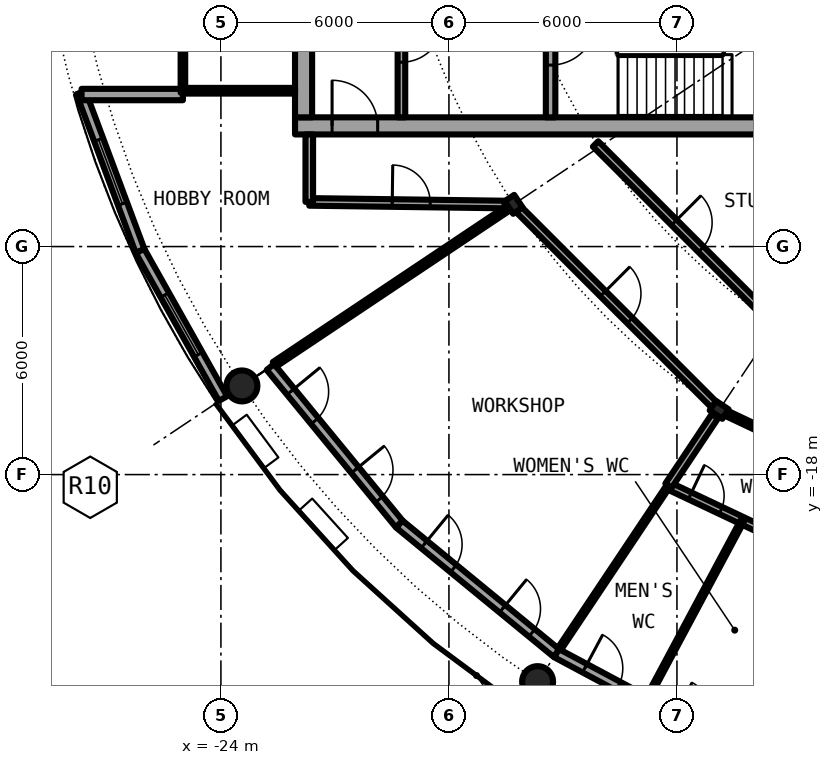
"""IFC4 building model, lengths in metres.
Left out: names, types, materials, properties, quantities, classifications, styles, units other than length and angle.
Written with IfcOpenShell. Run it as: python <this file> out.ifc"""

import sys

from ifc_helpers import new_model, si_unit, direction, frame, frame_2d, origin, origin_2d, place, context, subcontext, project, spatial, rectangle, hollow_circle, i_section, extrude, element, fill, save


model = new_model("IFC4")
c1 = context("Model", 3, precision=1e-05, world=origin(), true_north=direction((0.0, 1.0)))
c2 = subcontext(c1, "Body", "Model", "MODEL_VIEW")
j1 = project(units=[si_unit("LENGTHUNIT", "METRE"), si_unit("PLANEANGLEUNIT", "RADIAN")], contexts=[c1])
p1 = place(None, origin())
s1 = spatial("IfcSite", under=j1, at=p1, CompositionType="ELEMENT")
p2 = place(p1, origin())
s2 = spatial("IfcBuilding", under=s1, at=p2, CompositionType="ELEMENT")
p3 = place(p2, frame((0.0, 0.0, 208.5)))
s3 = spatial("IfcBuildingStorey", under=s2, at=p3, CompositionType="ELEMENT", Elevation=208.5)
for number, where, z_axis, x_axis in (
    (1, (-23.448, -15.667, 0.0), (0.0, 0.0, 1.0), (1.0, 0.0, 0.0)),
    (2, (-15.667, -23.448, 0.0), (0.0, 0.0, 1.0), (1.0, 0.0, 0.0)),
):
    element("IfcColumn", number, at=place(p3, frame(where, z_axis=z_axis, x_axis=x_axis)), inside=s3, PredefinedType="COLUMN", context=c2, shape_type="SweptSolid", body=[
        extrude(hollow_circle(Radius=0.406, WallThickness=0.03, at=origin_2d()), origin(), (0.0, 0.0, 1.0), 4.2),
    ])
for number, where, z_axis, x_axis in (
    (3, (-16.297, -10.889, 0.0), (0.0, 0.0, 1.0), (-0.831, -0.556, 0.0)),
    (4, (-10.889, -16.297, 0.0), (0.0, 0.0, 1.0), (-0.556, -0.831, 0.0)),
):
    element("IfcColumn", number, at=place(p3, frame(where, z_axis=z_axis, x_axis=x_axis)), inside=s3, PredefinedType="COLUMN", context=c2, shape_type="SweptSolid", body=[
        extrude(i_section(OverallWidth=0.3, OverallDepth=0.4, WebThickness=0.013, FlangeThickness=0.024, FilletRadius=0.027, at=origin_2d()), origin(), (0.0, 0.0, 1.0), 4.2),
    ])
p4 = place(p3, frame((-22.699, -15.167, 0.0), z_axis=(0.0, 0.0, 1.0), x_axis=(0.634382322723, -0.773019449054, 0.0)))
e5 = element("IfcWall", 5, at=p4, inside=s3, PredefinedType="SOLIDWALL", context=c2, shape_type="SweptSolid", body=[
    extrude(rectangle(XDim=5.352, YDim=0.25, at=frame_2d((2.676, 0.0))), origin(), (0.0, 0.0, 1.0), 3.85),
])
p5 = place(p4, frame((0.841, 0.0, 0.0)))
e6 = element("IfcOpeningElement", 6, at=p5, cuts=e5, PredefinedType="OPENING", context=c2, shape_type="SweptSolid", body=[
    extrude(rectangle(XDim=1.0, YDim=2.2, at=frame_2d((0.5, 1.1))), frame((0.0, 0.135, 0.0), z_axis=(0.0, -1.0, 0.0), x_axis=(1.0, 0.0, 0.0)), (0.0, 0.0, 1.0), 0.27),
])
p6 = place(p4, frame((3.51, 0.0, 0.0)))
e7 = element("IfcOpeningElement", 7, at=p6, cuts=e5, PredefinedType="OPENING", context=c2, shape_type="SweptSolid", body=[
    extrude(rectangle(XDim=1.0, YDim=2.2, at=frame_2d((0.5, 1.1))), frame((0.0, 0.135, 0.0), z_axis=(0.0, -1.0, 0.0), x_axis=(1.0, 0.0, 0.0)), (0.0, 0.0, 1.0), 0.27),
])
p7 = place(p3, frame((-19.304, -19.304, 0.0), z_axis=(0.0, 0.0, 1.0), x_axis=(0.773019449054, -0.634382322723, 0.0)))
e8 = element("IfcWall", 8, at=p7, inside=s3, PredefinedType="SOLIDWALL", context=c2, shape_type="SweptSolid", body=[
    extrude(rectangle(XDim=5.352, YDim=0.25, at=frame_2d((2.676, 0.0))), origin(), (0.0, 0.0, 1.0), 3.85),
])
p8 = place(p7, frame((0.841, 0.0, 0.0)))
e9 = element("IfcOpeningElement", 9, at=p8, cuts=e8, PredefinedType="OPENING", context=c2, shape_type="SweptSolid", body=[
    extrude(rectangle(XDim=1.0, YDim=2.2, at=frame_2d((0.5, 1.1))), frame((0.0, 0.135, 0.0), z_axis=(0.0, -1.0, 0.0), x_axis=(1.0, 0.0, 0.0)), (0.0, 0.0, 1.0), 0.27),
])
p9 = place(p7, frame((3.51, 0.0, 0.0)))
e10 = element("IfcOpeningElement", 10, at=p9, cuts=e8, PredefinedType="OPENING", context=c2, shape_type="SweptSolid", body=[
    extrude(rectangle(XDim=1.0, YDim=2.2, at=frame_2d((0.5, 1.1))), frame((0.0, 0.135, 0.0), z_axis=(0.0, -1.0, 0.0), x_axis=(1.0, 0.0, 0.0)), (0.0, 0.0, 1.0), 0.27),
])
p10 = place(p3, frame((-15.167, -22.699, 0.0), z_axis=(0.0, 0.0, 1.0), x_axis=(0.881915646801, -0.471407246368, 0.0)))
e11 = element("IfcWall", 11, at=p10, inside=s3, PredefinedType="SOLIDWALL", context=c2, shape_type="SweptSolid", body=[
    extrude(rectangle(XDim=5.352, YDim=0.25, at=frame_2d((2.676, 0.0))), origin(), (0.0, 0.0, 1.0), 3.85),
])
p11 = place(p10, frame((0.841, 0.0, 0.0)))
e12 = element("IfcOpeningElement", 12, at=p11, cuts=e11, PredefinedType="OPENING", context=c2, shape_type="SweptSolid", body=[
    extrude(rectangle(XDim=1.0, YDim=2.2, at=frame_2d((0.5, 1.1))), frame((0.0, 0.135, 0.0), z_axis=(0.0, -1.0, 0.0), x_axis=(1.0, 0.0, 0.0)), (0.0, 0.0, 1.0), 0.27),
])
p12 = place(p10, frame((3.51, 0.0, 0.0)))
e13 = element("IfcOpeningElement", 13, at=p12, cuts=e11, PredefinedType="OPENING", context=c2, shape_type="SweptSolid", body=[
    extrude(rectangle(XDim=1.0, YDim=2.2, at=frame_2d((0.5, 1.1))), frame((0.0, 0.135, 0.0), z_axis=(0.0, -1.0, 0.0), x_axis=(1.0, 0.0, 0.0)), (0.0, 0.0, 1.0), 0.27),
])
p13 = place(p3, frame((-27.682, -7.945, 0.0), z_axis=(0.0, 0.0, 1.0), x_axis=(0.349247811493, -0.937030397675, 0.0)))
e14 = element("IfcWall", 14, at=p13, inside=s3, PredefinedType="SOLIDWALL", context=c2, shape_type="SweptSolid", body=[
    extrude(rectangle(XDim=4.452, YDim=0.25, at=frame_2d((2.226, 0.0))), origin(), (0.0, 0.0, 1.0), 3.85),
])
p14 = place(p13, frame((1.327, 0.0, 0.3)))
e15 = element("IfcOpeningElement", 15, at=p14, cuts=e14, PredefinedType="OPENING", context=c2, shape_type="SweptSolid", body=[
    extrude(rectangle(XDim=1.8, YDim=2.1, at=frame_2d((0.9, 1.05))), frame((0.0, 0.135, 0.0), z_axis=(0.0, -1.0, 0.0), x_axis=(1.0, 0.0, 0.0)), (0.0, 0.0, 1.0), 0.27),
])
p15 = place(p3, frame((-26.127, -12.117, 0.0), z_axis=(0.0, 0.0, 1.0), x_axis=(0.489696356642, -0.871893042919, 0.0)))
e16 = element("IfcWall", 16, at=p15, inside=s3, PredefinedType="SOLIDWALL", context=c2, shape_type="SweptSolid", body=[
    extrude(rectangle(XDim=4.454, YDim=0.25, at=frame_2d((2.227, 0.0))), origin(), (0.0, 0.0, 1.0), 3.85),
])
p16 = place(p15, frame((1.327, 0.0, 0.3)))
e17 = element("IfcOpeningElement", 17, at=p16, cuts=e16, PredefinedType="OPENING", context=c2, shape_type="SweptSolid", body=[
    extrude(rectangle(XDim=1.8, YDim=2.1, at=frame_2d((0.9, 1.05))), frame((0.0, 0.135, 0.0), z_axis=(0.0, -1.0, 0.0), x_axis=(1.0, 0.0, 0.0)), (0.0, 0.0, 1.0), 0.27),
])
p17 = place(p3, frame((-25.0, -8.0, 0.0), z_axis=(0.0, 0.0, 1.0), x_axis=(-1.0, 0.0, 0.0)))
e18 = element("IfcWall", 18, at=p17, inside=s3, PredefinedType="SOLIDWALL", context=c2, shape_type="SweptSolid", body=[
    extrude(rectangle(XDim=2.667, YDim=0.3, at=frame_2d((1.333, 0.0))), origin(), (0.0, 0.0, 1.0), 3.85),
])
p18 = place(p3, frame((-22.05, -8.825, 0.0), z_axis=(0.0, 0.0, 1.0), x_axis=(1.0, 0.0, 0.0)))
e19 = element("IfcWall", 19, at=p18, inside=s3, PredefinedType="SHEAR", context=c2, shape_type="SweptSolid", body=[
    extrude(rectangle(XDim=13.5, YDim=0.45, at=frame_2d((6.75, 0.0))), origin(), (0.0, 0.0, 1.0), 4.2),
])
p19 = place(p18, frame((0.975, 0.0, 0.0)))
e20 = element("IfcOpeningElement", 20, at=p19, cuts=e19, PredefinedType="OPENING", context=c2, shape_type="SweptSolid", body=[
    extrude(rectangle(XDim=1.2, YDim=2.3, at=frame_2d((0.6, 1.15))), frame((0.0, 0.235, 0.0), z_axis=(0.0, -1.0, 0.0), x_axis=(1.0, 0.0, 0.0)), (0.0, 0.0, 1.0), 0.47),
])
p20 = place(p3, frame((-21.825, -8.6, 0.0), z_axis=(0.0, 0.0, 1.0), x_axis=(0.0, 1.0, 0.0)))
e21 = element("IfcWall", 21, at=p20, inside=s3, PredefinedType="SHEAR", context=c2, shape_type="SweptSolid", body=[
    extrude(rectangle(XDim=17.2, YDim=0.45, at=frame_2d((8.6, 0.0))), origin(), (0.0, 0.0, 1.0), 4.2),
])
p21 = place(p20, frame((7.7, 0.0, 0.0)))
e22 = element("IfcOpeningElement", 22, at=p21, cuts=e21, PredefinedType="OPENING", context=c2, shape_type="SweptSolid", body=[
    extrude(rectangle(XDim=1.8, YDim=2.3, at=frame_2d((0.9, 1.15))), frame((0.0, 0.235, 0.0), z_axis=(0.0, -1.0, 0.0), x_axis=(1.0, 0.0, 0.0)), (0.0, 0.0, 1.0), 0.47),
])
p22 = place(p3, frame((-15.325, -4.65, 0.0), z_axis=(0.0, 0.0, 1.0), x_axis=(0.0, -1.0, 0.0)))
e23 = element("IfcWall", 23, at=p22, inside=s3, PredefinedType="SHEAR", context=c2, shape_type="SweptSolid", body=[
    extrude(rectangle(XDim=3.95, YDim=0.25, at=frame_2d((1.975, 0.0))), origin(), (0.0, 0.0, 1.0), 4.2),
])
p23 = place(p22, frame((1.375, 0.0, 0.0)))
e24 = element("IfcOpeningElement", 24, at=p23, cuts=e23, PredefinedType="OPENING", context=c2, shape_type="SweptSolid", body=[
    extrude(rectangle(XDim=1.2, YDim=2.3, at=frame_2d((0.6, 1.15))), frame((0.0, 0.135, 0.0), z_axis=(0.0, -1.0, 0.0), x_axis=(1.0, 0.0, 0.0)), (0.0, 0.0, 1.0), 0.27),
])
p24 = place(p3, frame((-19.25, -1.575, 0.0), z_axis=(0.0, 0.0, 1.0), x_axis=(0.0, -1.0, 0.0)))
e25 = element("IfcWall", 25, at=p24, inside=s3, PredefinedType="SOLIDWALL", context=c2, shape_type="SweptSolid", body=[
    extrude(rectangle(XDim=7.025, YDim=0.2, at=frame_2d((3.513, 0.0))), origin(), (0.0, 0.0, 1.0), 3.85),
])
p25 = place(p24, frame((4.475, 0.0, 0.0)))
e26 = element("IfcOpeningElement", 26, at=p25, cuts=e25, PredefinedType="OPENING", context=c2, shape_type="SweptSolid", body=[
    extrude(rectangle(XDim=1.1, YDim=2.3, at=frame_2d((0.55, 1.15))), frame((0.0, 0.11, 0.0), z_axis=(0.0, -1.0, 0.0), x_axis=(1.0, 0.0, 0.0)), (0.0, 0.0, 1.0), 0.22),
])
p26 = place(p3, frame((-22.05, -7.9, 0.0), z_axis=(0.0, 0.0, 1.0), x_axis=(-1.0, 0.0, 0.0)))
e27 = element("IfcWall", 27, at=p26, inside=s3, PredefinedType="PARTITIONING", context=c2, shape_type="SweptSolid", body=[
    extrude(rectangle(XDim=2.89, YDim=0.15, at=frame_2d((1.445, 0.0))), origin(), (0.0, 0.0, 1.0), 3.85),
])
p27 = place(p3, frame((-25.0, 7.95, 0.0), z_axis=(0.0, 0.0, 1.0), x_axis=(0.0, -1.0, 0.0)))
e28 = element("IfcWall", 28, at=p27, inside=s3, PredefinedType="PARTITIONING", context=c2, shape_type="SweptSolid", body=[
    extrude(rectangle(XDim=15.9, YDim=0.12, at=frame_2d((7.95, 0.0))), origin(), (0.0, 0.0, 1.0), 3.85),
])
p28 = place(p27, frame((0.95, 0.0, 0.1)))
e29 = element("IfcOpeningElement", 29, at=p28, cuts=e28, PredefinedType="OPENING", context=c2, shape_type="SweptSolid", body=[
    extrude(rectangle(XDim=14.0, YDim=3.5, at=frame_2d((7.0, 1.75))), frame((0.0, 0.07, 0.0), z_axis=(0.0, -1.0, 0.0), x_axis=(1.0, 0.0, 0.0)), (0.0, 0.0, 1.0), 0.14),
])
p29 = place(p3, frame((-12.223, -18.294, 0.0), z_axis=(0.0, 0.0, 1.0), x_axis=(0.904110764787, -0.427298168726, 0.0)))
e30 = element("IfcWall", 30, at=p29, inside=s3, PredefinedType="PARTITIONING", context=c2, shape_type="SweptSolid", body=[
    extrude(rectangle(XDim=6.459, YDim=0.2, at=frame_2d((3.229, 0.0))), origin(), (0.0, 0.0, 1.0), 3.85),
])
p30 = place(p29, frame((0.624, 0.0, 0.0)))
e31 = element("IfcOpeningElement", 31, at=p30, cuts=e30, PredefinedType="OPENING", context=c2, shape_type="SweptSolid", body=[
    extrude(rectangle(XDim=0.9, YDim=2.3, at=frame_2d((0.45, 1.15))), frame((0.0, 0.11, 0.0), z_axis=(0.0, -1.0, 0.0), x_axis=(1.0, 0.0, 0.0)), (0.0, 0.0, 1.0), 0.22),
])
p31 = place(p29, frame((2.788, 0.0, 0.0)))
e32 = element("IfcOpeningElement", 32, at=p31, cuts=e30, PredefinedType="OPENING", context=c2, shape_type="SweptSolid", body=[
    extrude(rectangle(XDim=0.9, YDim=2.3, at=frame_2d((0.45, 1.15))), frame((0.0, 0.11, 0.0), z_axis=(0.0, -1.0, 0.0), x_axis=(1.0, 0.0, 0.0)), (0.0, 0.0, 1.0), 0.22),
])
p32 = place(p29, frame((4.93, 0.0, 0.0)))
e33 = element("IfcOpeningElement", 33, at=p32, cuts=e30, PredefinedType="OPENING", context=c2, shape_type="SweptSolid", body=[
    extrude(rectangle(XDim=0.9, YDim=2.3, at=frame_2d((0.45, 1.15))), frame((0.0, 0.11, 0.0), z_axis=(0.0, -1.0, 0.0), x_axis=(1.0, 0.0, 0.0)), (0.0, 0.0, 1.0), 0.22),
])
p33 = place(p3, frame((-10.752, -16.362, 0.0), z_axis=(0.0, 0.0, 1.0), x_axis=(0.903996904196, -0.427539000798, 0.0)))
e34 = element("IfcWall", 34, at=p33, inside=s3, PredefinedType="PARTITIONING", context=c2, shape_type="SweptSolid", body=[
    extrude(rectangle(XDim=5.6, YDim=0.15, at=frame_2d((2.8, 0.0))), origin(), (0.0, 0.0, 1.0), 3.6),
])
p34 = place(p33, frame((2.224, 0.0, 0.0)))
e35 = element("IfcOpeningElement", 35, at=p34, cuts=e34, PredefinedType="OPENING", context=c2, shape_type="SweptSolid", body=[
    extrude(rectangle(XDim=1.0, YDim=2.3, at=frame_2d((0.5, 1.15))), frame((0.0, 0.085, 0.0), z_axis=(0.0, -1.0, 0.0), x_axis=(1.0, 0.0, 0.0)), (0.0, 0.0, 1.0), 0.17),
])
p35 = place(p3, frame((-16.189, -10.997, 0.0), z_axis=(0.0, 0.0, 1.0), x_axis=(0.707106781187, -0.707106781187, 0.0)))
e36 = element("IfcWall", 36, at=p35, inside=s3, PredefinedType="PARTITIONING", context=c2, shape_type="SweptSolid", body=[
    extrude(rectangle(XDim=7.343, YDim=0.2, at=frame_2d((3.671, 0.0))), origin(), (0.0, 0.0, 1.0), 3.6),
])
p36 = place(p35, frame((3.171, 0.0, 0.0)))
e37 = element("IfcOpeningElement", 37, at=p36, cuts=e36, PredefinedType="OPENING", context=c2, shape_type="SweptSolid", body=[
    extrude(rectangle(XDim=1.0, YDim=2.3, at=frame_2d((0.5, 1.15))), frame((0.0, 0.11, 0.0), z_axis=(0.0, -1.0, 0.0), x_axis=(1.0, 0.0, 0.0)), (0.0, 0.0, 1.0), 0.22),
])
p37 = place(p3, frame((-14.141, -9.3, 0.0), z_axis=(0.0, 0.0, 1.0), x_axis=(0.707124944964, -0.707088616942, 0.0)))
e38 = element("IfcWall", 38, at=p37, inside=s3, PredefinedType="PARTITIONING", context=c2, shape_type="SweptSolid", body=[
    extrude(rectangle(XDim=6.72, YDim=0.2, at=frame_2d((3.36, 0.0))), origin(), (0.0, 0.0, 1.0), 3.85),
])
p38 = place(p37, frame((2.923, 0.0, 0.0)))
e39 = element("IfcOpeningElement", 39, at=p38, cuts=e38, PredefinedType="OPENING", context=c2, shape_type="SweptSolid", body=[
    extrude(rectangle(XDim=1.0, YDim=2.3, at=frame_2d((0.5, 1.15))), frame((0.0, 0.11, 0.0), z_axis=(0.0, -1.0, 0.0), x_axis=(1.0, 0.0, 0.0)), (0.0, 0.0, 1.0), 0.22),
])
p39 = place(p3, frame((-21.675, -10.825, 0.0), z_axis=(0.0, 0.0, 1.0), x_axis=(0.999909707888, -0.013437859594, 0.0)))
e40 = element("IfcWall", 40, at=p39, inside=s3, PredefinedType="PARTITIONING", context=c2, shape_type="SweptSolid", body=[
    extrude(rectangle(XDim=5.142, YDim=0.2, at=frame_2d((2.571, 0.0))), origin(), (0.0, 0.0, 1.0), 3.85),
])
p40 = place(p39, frame((2.183, 0.0, 0.0)))
e41 = element("IfcOpeningElement", 41, at=p40, cuts=e40, PredefinedType="OPENING", context=c2, shape_type="SweptSolid", body=[
    extrude(rectangle(XDim=1.0, YDim=2.3, at=frame_2d((0.5, 1.15))), frame((0.0, 0.11, 0.0), z_axis=(0.0, -1.0, 0.0), x_axis=(1.0, 0.0, 0.0)), (0.0, 0.0, 1.0), 0.22),
])
p41 = place(p3, frame((-22.593, -15.101, 0.0), z_axis=(0.0, 0.0, 1.0), x_axis=(0.831418274402, 0.555647057933, 0.0)))
e42 = element("IfcWall", 42, at=p41, inside=s3, PredefinedType="PARTITIONING", context=c2, shape_type="SweptSolid", body=[
    extrude(rectangle(XDim=7.375, YDim=0.15, at=frame_2d((3.688, 0.0))), origin(), (0.0, 0.0, 1.0), 3.85),
])
p42 = place(p3, frame((-15.098, -22.595, 0.0), z_axis=(0.0, 0.0, 1.0), x_axis=(0.555679526155, 0.831396574573, 0.0)))
e43 = element("IfcWall", 43, at=p42, inside=s3, PredefinedType="PARTITIONING", context=c2, shape_type="SweptSolid", body=[
    extrude(rectangle(XDim=5.176, YDim=0.1, at=frame_2d((2.588, 0.0))), origin(), (0.0, 0.0, 1.0), 3.85),
])
p43 = place(p3, frame((-12.818, -23.962, 0.0), z_axis=(0.0, 0.0, 1.0), x_axis=(0.471698142177, 0.881760093601, 0.0)))
e44 = element("IfcWall", 44, at=p43, inside=s3, PredefinedType="PARTITIONING", context=c2, shape_type="SweptSolid", body=[
    extrude(rectangle(XDim=5.387, YDim=0.1, at=frame_2d((2.693, 0.0))), origin(), (0.0, 0.0, 1.0), 3.85),
])
p44 = place(p3, frame((-12.222, -18.292, 0.0), z_axis=(0.0, 0.0, 1.0), x_axis=(0.555493933307, 0.831520589077, 0.0)))
e45 = element("IfcWall", 45, at=p44, inside=s3, PredefinedType="PARTITIONING", context=c2, shape_type="SweptSolid", body=[
    extrude(rectangle(XDim=2.2, YDim=0.2, at=frame_2d((1.1, 0.0))), origin(), (0.0, 0.0, 1.0), 3.85),
])
p45 = place(p3, frame((-10.391, -25.11, 0.0), z_axis=(0.0, 0.0, 1.0), x_axis=(0.38229040446, 0.924042232075, 0.0)))
e46 = element("IfcWall", 46, at=p45, inside=s3, PredefinedType="PARTITIONING", context=c2, shape_type="SweptSolid", body=[
    extrude(rectangle(XDim=5.386, YDim=0.1, at=frame_2d((2.693, 0.0))), origin(), (0.0, 0.0, 1.0), 3.85),
])
p46 = place(p3, frame((-21.675, -10.825, 0.0), z_axis=(0.0, 0.0, 1.0), x_axis=(0.0, 1.0, 0.0)))
e47 = element("IfcWall", 47, at=p46, inside=s3, PredefinedType="PARTITIONING", context=c2, shape_type="SweptSolid", body=[
    extrude(rectangle(XDim=1.775, YDim=0.2, at=frame_2d((0.887, 0.0))), origin(), (0.0, 0.0, 1.0), 3.85),
])
p47 = place(p5, origin())
e48 = element("IfcDoor", 48, at=p47, inside=s3, OperationType="SINGLE_SWING_LEFT", PredefinedType="DOOR", context=c2, shape_type="SweptSolid", body=[
    extrude(rectangle(XDim=1.0, YDim=2.2, at=frame_2d((0.5, 1.1))), frame((0.0, 0.025, 0.0), z_axis=(0.0, -1.0, 0.0), x_axis=(1.0, 0.0, 0.0)), (0.0, 0.0, 1.0), 0.05),
])
fill(e6, e48)
p48 = place(p6, origin())
e49 = element("IfcDoor", 49, at=p48, inside=s3, OperationType="SINGLE_SWING_LEFT", PredefinedType="DOOR", context=c2, shape_type="SweptSolid", body=[
    extrude(rectangle(XDim=1.0, YDim=2.2, at=frame_2d((0.5, 1.1))), frame((0.0, 0.025, 0.0), z_axis=(0.0, -1.0, 0.0), x_axis=(1.0, 0.0, 0.0)), (0.0, 0.0, 1.0), 0.05),
])
fill(e7, e49)
p49 = place(p8, origin())
e50 = element("IfcDoor", 50, at=p49, inside=s3, OperationType="SINGLE_SWING_LEFT", PredefinedType="DOOR", context=c2, shape_type="SweptSolid", body=[
    extrude(rectangle(XDim=1.0, YDim=2.2, at=frame_2d((0.5, 1.1))), frame((0.0, 0.025, 0.0), z_axis=(0.0, -1.0, 0.0), x_axis=(1.0, 0.0, 0.0)), (0.0, 0.0, 1.0), 0.05),
])
fill(e9, e50)
p50 = place(p9, origin())
e51 = element("IfcDoor", 51, at=p50, inside=s3, OperationType="SINGLE_SWING_LEFT", PredefinedType="DOOR", context=c2, shape_type="SweptSolid", body=[
    extrude(rectangle(XDim=1.0, YDim=2.2, at=frame_2d((0.5, 1.1))), frame((0.0, 0.025, 0.0), z_axis=(0.0, -1.0, 0.0), x_axis=(1.0, 0.0, 0.0)), (0.0, 0.0, 1.0), 0.05),
])
fill(e10, e51)
p51 = place(p11, origin())
e52 = element("IfcDoor", 52, at=p51, inside=s3, OperationType="SINGLE_SWING_LEFT", PredefinedType="DOOR", context=c2, shape_type="SweptSolid", body=[
    extrude(rectangle(XDim=1.0, YDim=2.2, at=frame_2d((0.5, 1.1))), frame((0.0, 0.025, 0.0), z_axis=(0.0, -1.0, 0.0), x_axis=(1.0, 0.0, 0.0)), (0.0, 0.0, 1.0), 0.05),
])
fill(e12, e52)
p52 = place(p14, origin())
e53 = element("IfcWindow", 53, at=p52, inside=s3, PartitioningType="SINGLE_PANEL", PredefinedType="WINDOW", context=c2, shape_type="SweptSolid", body=[
    extrude(rectangle(XDim=1.8, YDim=2.1, at=frame_2d((0.9, 1.05))), frame((0.0, 0.03, 0.0), z_axis=(0.0, -1.0, 0.0), x_axis=(1.0, 0.0, 0.0)), (0.0, 0.0, 1.0), 0.06),
])
fill(e15, e53)
p53 = place(p16, origin())
e54 = element("IfcWindow", 54, at=p53, inside=s3, PartitioningType="SINGLE_PANEL", PredefinedType="WINDOW", context=c2, shape_type="SweptSolid", body=[
    extrude(rectangle(XDim=1.8, YDim=2.1, at=frame_2d((0.9, 1.05))), frame((0.0, 0.03, 0.0), z_axis=(0.0, -1.0, 0.0), x_axis=(1.0, 0.0, 0.0)), (0.0, 0.0, 1.0), 0.06),
])
fill(e17, e54)
p54 = place(p23, origin())
e55 = element("IfcDoor", 55, at=p54, inside=s3, OperationType="SINGLE_SWING_LEFT", PredefinedType="DOOR", context=c2, shape_type="SweptSolid", body=[
    extrude(rectangle(XDim=1.2, YDim=2.3, at=frame_2d((0.6, 1.15))), frame((0.0, 0.025, 0.0), z_axis=(0.0, -1.0, 0.0), x_axis=(1.0, 0.0, 0.0)), (0.0, 0.0, 1.0), 0.05),
])
fill(e24, e55)
p55 = place(p25, origin())
e56 = element("IfcDoor", 56, at=p55, inside=s3, OperationType="SINGLE_SWING_LEFT", PredefinedType="DOOR", context=c2, shape_type="SweptSolid", body=[
    extrude(rectangle(XDim=1.1, YDim=2.3, at=frame_2d((0.55, 1.15))), frame((0.0, 0.025, 0.0), z_axis=(0.0, -1.0, 0.0), x_axis=(1.0, 0.0, 0.0)), (0.0, 0.0, 1.0), 0.05),
])
fill(e26, e56)
p56 = place(p19, origin())
e57 = element("IfcDoor", 57, at=p56, inside=s3, OperationType="SINGLE_SWING_RIGHT", PredefinedType="DOOR", context=c2, shape_type="SweptSolid", body=[
    extrude(rectangle(XDim=1.2, YDim=2.3, at=frame_2d((0.6, 1.15))), frame((0.0, 0.025, 0.0), z_axis=(0.0, -1.0, 0.0), x_axis=(1.0, 0.0, 0.0)), (0.0, 0.0, 1.0), 0.05),
])
fill(e20, e57)
p57 = place(p28, origin())
e58 = element("IfcWindow", 58, at=p57, inside=s3, PartitioningType="SINGLE_PANEL", PredefinedType="WINDOW", context=c2, shape_type="SweptSolid", body=[
    extrude(rectangle(XDim=14.0, YDim=3.5, at=frame_2d((7.0, 1.75))), frame((0.0, 0.03, 0.0), z_axis=(0.0, -1.0, 0.0), x_axis=(1.0, 0.0, 0.0)), (0.0, 0.0, 1.0), 0.06),
])
fill(e29, e58)
p58 = place(p30, origin())
e59 = element("IfcDoor", 59, at=p58, inside=s3, OperationType="SINGLE_SWING_LEFT", PredefinedType="DOOR", context=c2, shape_type="SweptSolid", body=[
    extrude(rectangle(XDim=0.9, YDim=2.3, at=frame_2d((0.45, 1.15))), frame((0.0, 0.025, 0.0), z_axis=(0.0, -1.0, 0.0), x_axis=(1.0, 0.0, 0.0)), (0.0, 0.0, 1.0), 0.05),
])
fill(e31, e59)
p59 = place(p36, origin())
e60 = element("IfcDoor", 60, at=p59, inside=s3, OperationType="SINGLE_SWING_RIGHT", PredefinedType="DOOR", context=c2, shape_type="SweptSolid", body=[
    extrude(rectangle(XDim=1.0, YDim=2.3, at=frame_2d((0.5, 1.15))), frame((0.0, 0.025, 0.0), z_axis=(0.0, -1.0, 0.0), x_axis=(1.0, 0.0, 0.0)), (0.0, 0.0, 1.0), 0.05),
])
fill(e37, e60)
p60 = place(p38, origin())
e61 = element("IfcDoor", 61, at=p60, inside=s3, OperationType="SINGLE_SWING_LEFT", PredefinedType="DOOR", context=c2, shape_type="SweptSolid", body=[
    extrude(rectangle(XDim=1.0, YDim=2.3, at=frame_2d((0.5, 1.15))), frame((0.0, 0.025, 0.0), z_axis=(0.0, -1.0, 0.0), x_axis=(1.0, 0.0, 0.0)), (0.0, 0.0, 1.0), 0.05),
])
fill(e39, e61)
p61 = place(p40, origin())
e62 = element("IfcDoor", 62, at=p61, inside=s3, OperationType="SINGLE_SWING_RIGHT", PredefinedType="DOOR", context=c2, shape_type="SweptSolid", body=[
    extrude(rectangle(XDim=1.0, YDim=2.3, at=frame_2d((0.5, 1.15))), frame((0.0, 0.025, 0.0), z_axis=(0.0, -1.0, 0.0), x_axis=(1.0, 0.0, 0.0)), (0.0, 0.0, 1.0), 0.05),
])
fill(e41, e62)
save(model, sys.argv[1])
